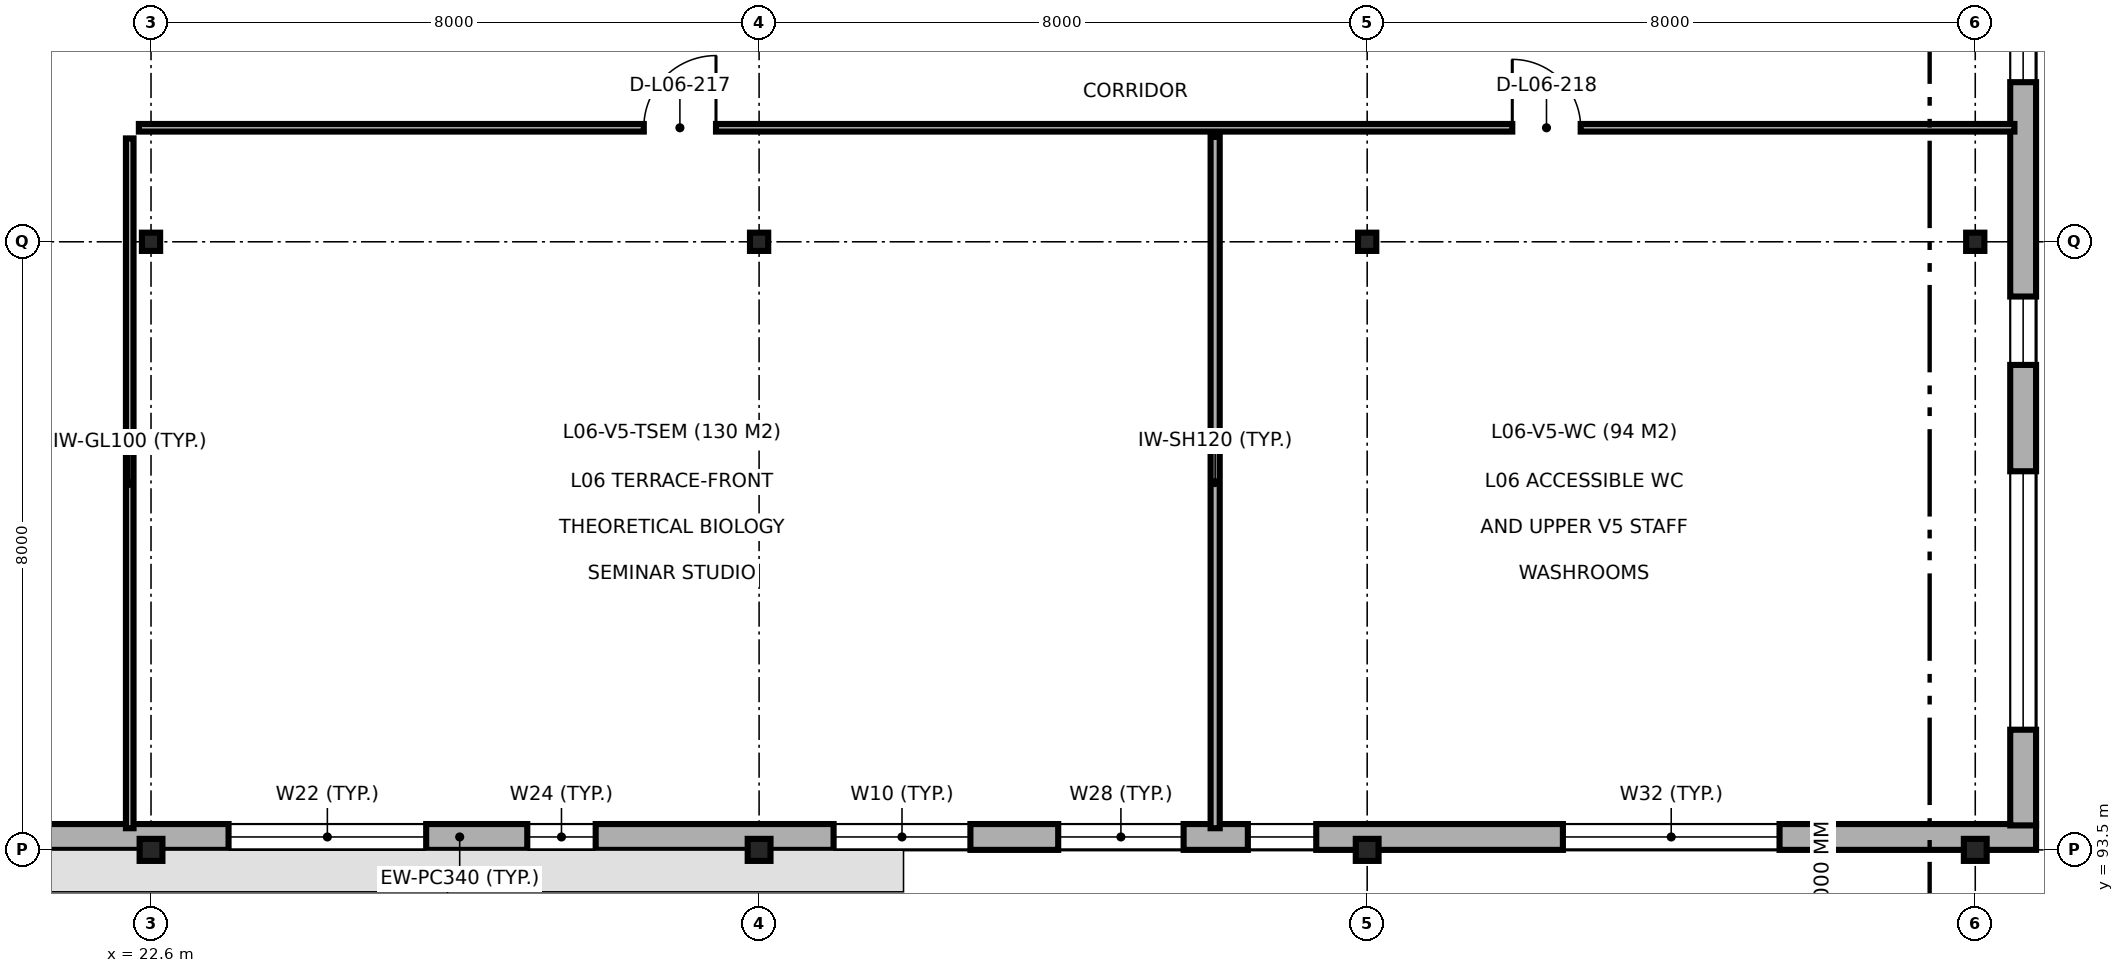
"""IFC4 building model, lengths in metres.
Left out: names, types, materials, properties, quantities, classifications, styles, units other than length and angle.
Written with IfcOpenShell. Run it as: python <this file> out.ifc"""

import sys

from ifc_helpers import new_model, si_unit, direction, frame, frame_2d, origin, origin_2d, place, context, subcontext, project, spatial, rectangle, i_section, extrude, element, fill, save


model = new_model("IFC4")
c1 = context("Model", 3, precision=1e-05, world=origin(), true_north=direction((0.0, 1.0)))
c2 = subcontext(c1, "Body", "Model", "MODEL_VIEW")
j1 = project(units=[si_unit("LENGTHUNIT", "METRE"), si_unit("PLANEANGLEUNIT", "RADIAN")], contexts=[c1])
p1 = place(None, origin())
s1 = spatial("IfcSite", under=j1, at=p1, CompositionType="ELEMENT")
p2 = place(p1, origin())
s2 = spatial("IfcBuilding", under=s1, at=p2, CompositionType="ELEMENT")
p3 = place(p2, frame((0.0, 0.0, 26.7)))
s3 = spatial("IfcBuildingStorey", under=s2, at=p3, CompositionType="ELEMENT", Elevation=26.7)
p4 = place(p3, frame((22.6, 93.5, 0.0), z_axis=(0.0, 0.0, 1.0), x_axis=(1.0, 0.0, 0.0)))
e1 = element("IfcColumn", 1, at=p4, inside=s3, PredefinedType="COLUMN", context=c2, shape_type="SweptSolid", body=[
    extrude(i_section(OverallWidth=0.3, OverallDepth=0.29, WebThickness=0.009, FlangeThickness=0.014, FilletRadius=0.027, at=origin_2d()), origin(), (0.0, 0.0, 1.0), 3.9),
])
p5 = place(p3, frame((22.6, 101.5, 0.0), z_axis=(0.0, 0.0, 1.0), x_axis=(1.0, 0.0, 0.0)))
e2 = element("IfcColumn", 2, at=p5, inside=s3, PredefinedType="COLUMN", context=c2, shape_type="SweptSolid", body=[
    extrude(i_section(OverallWidth=0.24, OverallDepth=0.24, WebThickness=0.01, FlangeThickness=0.017, FilletRadius=0.021, at=origin_2d()), origin(), (0.0, 0.0, 1.0), 3.9),
])
p6 = place(p3, frame((30.6, 93.5, 0.0), z_axis=(0.0, 0.0, 1.0), x_axis=(1.0, 0.0, 0.0)))
e3 = element("IfcColumn", 3, at=p6, inside=s3, PredefinedType="COLUMN", context=c2, shape_type="SweptSolid", body=[
    extrude(i_section(OverallWidth=0.3, OverallDepth=0.29, WebThickness=0.009, FlangeThickness=0.014, FilletRadius=0.027, at=origin_2d()), origin(), (0.0, 0.0, 1.0), 3.9),
])
p7 = place(p3, frame((30.6, 101.5, 0.0), z_axis=(0.0, 0.0, 1.0), x_axis=(1.0, 0.0, 0.0)))
e4 = element("IfcColumn", 4, at=p7, inside=s3, PredefinedType="COLUMN", context=c2, shape_type="SweptSolid", body=[
    extrude(i_section(OverallWidth=0.24, OverallDepth=0.24, WebThickness=0.01, FlangeThickness=0.017, FilletRadius=0.021, at=origin_2d()), origin(), (0.0, 0.0, 1.0), 3.9),
])
p8 = place(p3, frame((38.6, 93.5, 0.0), z_axis=(0.0, 0.0, 1.0), x_axis=(1.0, 0.0, 0.0)))
e5 = element("IfcColumn", 5, at=p8, inside=s3, PredefinedType="COLUMN", context=c2, shape_type="SweptSolid", body=[
    extrude(i_section(OverallWidth=0.3, OverallDepth=0.29, WebThickness=0.009, FlangeThickness=0.014, FilletRadius=0.027, at=origin_2d()), origin(), (0.0, 0.0, 1.0), 3.9),
])
p9 = place(p3, frame((38.6, 101.5, 0.0), z_axis=(0.0, 0.0, 1.0), x_axis=(1.0, 0.0, 0.0)))
e6 = element("IfcColumn", 6, at=p9, inside=s3, PredefinedType="COLUMN", context=c2, shape_type="SweptSolid", body=[
    extrude(i_section(OverallWidth=0.24, OverallDepth=0.24, WebThickness=0.01, FlangeThickness=0.017, FilletRadius=0.021, at=origin_2d()), origin(), (0.0, 0.0, 1.0), 3.9),
])
p10 = place(p3, frame((46.6, 93.5, 0.0), z_axis=(0.0, 0.0, 1.0), x_axis=(1.0, 0.0, 0.0)))
e7 = element("IfcColumn", 7, at=p10, inside=s3, PredefinedType="COLUMN", context=c2, shape_type="SweptSolid", body=[
    extrude(i_section(OverallWidth=0.3, OverallDepth=0.29, WebThickness=0.009, FlangeThickness=0.014, FilletRadius=0.027, at=origin_2d()), origin(), (0.0, 0.0, 1.0), 3.9),
])
p11 = place(p3, frame((46.6, 101.5, 0.0), z_axis=(0.0, 0.0, 1.0), x_axis=(1.0, 0.0, 0.0)))
e8 = element("IfcColumn", 8, at=p11, inside=s3, PredefinedType="COLUMN", context=c2, shape_type="SweptSolid", body=[
    extrude(i_section(OverallWidth=0.24, OverallDepth=0.24, WebThickness=0.01, FlangeThickness=0.017, FilletRadius=0.021, at=origin_2d()), origin(), (0.0, 0.0, 1.0), 3.9),
])
p12 = place(p3, frame((5.922, 93.67, 0.0), z_axis=(0.0, 0.0, 1.0), x_axis=(1.0, 0.0, 0.0)))
e9 = element("IfcWall", 9, at=p12, inside=s3, PredefinedType="SOLIDWALL", context=c2, shape_type="SweptSolid", body=[
    extrude(rectangle(XDim=41.478, YDim=0.34, at=frame_2d((20.739, 0.0))), origin(), (0.0, 0.0, 1.0), 3.66),
])
p13 = place(p12, frame((3.928, 0.0, 0.9)))
e10 = element("IfcOpeningElement", 10, at=p13, cuts=e9, PredefinedType="OPENING", context=c2, shape_type="SweptSolid", body=[
    extrude(rectangle(XDim=1.5, YDim=1.5, at=frame_2d((0.75, 0.75))), frame((0.0, 0.18, 0.0), z_axis=(0.0, -1.0, 0.0), x_axis=(1.0, 0.0, 0.0)), (0.0, 0.0, 1.0), 0.36),
])
p14 = place(p12, frame((9.498, 0.0, 0.9)))
e11 = element("IfcOpeningElement", 11, at=p14, cuts=e9, PredefinedType="OPENING", context=c2, shape_type="SweptSolid", body=[
    extrude(rectangle(XDim=2.4, YDim=1.5, at=frame_2d((1.2, 0.75))), frame((0.0, 0.18, 0.0), z_axis=(0.0, -1.0, 0.0), x_axis=(1.0, 0.0, 0.0)), (0.0, 0.0, 1.0), 0.36),
])
p15 = place(p12, frame((13.438, 0.0, 0.9)))
e12 = element("IfcOpeningElement", 12, at=p15, cuts=e9, PredefinedType="OPENING", context=c2, shape_type="SweptSolid", body=[
    extrude(rectangle(XDim=1.6, YDim=2.4, at=frame_2d((0.8, 1.2))), frame((0.0, 0.18, 0.0), z_axis=(0.0, -1.0, 0.0), x_axis=(1.0, 0.0, 0.0)), (0.0, 0.0, 1.0), 0.36),
])
p16 = place(p12, frame((17.698, 0.0, 0.9)))
e13 = element("IfcOpeningElement", 13, at=p16, cuts=e9, PredefinedType="OPENING", context=c2, shape_type="SweptSolid", body=[
    extrude(rectangle(XDim=2.6, YDim=2.4, at=frame_2d((1.3, 1.2))), frame((0.0, 0.18, 0.0), z_axis=(0.0, -1.0, 0.0), x_axis=(1.0, 0.0, 0.0)), (0.0, 0.0, 1.0), 0.36),
])
p17 = place(p12, frame((21.628, 0.0, 0.9)))
e14 = element("IfcOpeningElement", 14, at=p17, cuts=e9, PredefinedType="OPENING", context=c2, shape_type="SweptSolid", body=[
    extrude(rectangle(XDim=0.9, YDim=1.8, at=frame_2d((0.45, 0.9))), frame((0.0, 0.18, 0.0), z_axis=(0.0, -1.0, 0.0), x_axis=(1.0, 0.0, 0.0)), (0.0, 0.0, 1.0), 0.36),
])
p18 = place(p12, frame((25.658, 0.0, 0.9)))
e15 = element("IfcOpeningElement", 15, at=p18, cuts=e9, PredefinedType="OPENING", context=c2, shape_type="SweptSolid", body=[
    extrude(rectangle(XDim=1.8, YDim=2.1, at=frame_2d((0.9, 1.05))), frame((0.0, 0.18, 0.0), z_axis=(0.0, -1.0, 0.0), x_axis=(1.0, 0.0, 0.0)), (0.0, 0.0, 1.0), 0.36),
])
p19 = place(p12, frame((28.613, 0.0, 0.9)))
e16 = element("IfcOpeningElement", 16, at=p19, cuts=e9, PredefinedType="OPENING", context=c2, shape_type="SweptSolid", body=[
    extrude(rectangle(XDim=1.65, YDim=1.95, at=frame_2d((0.825, 0.975))), frame((0.0, 0.18, 0.0), z_axis=(0.0, -1.0, 0.0), x_axis=(1.0, 0.0, 0.0)), (0.0, 0.0, 1.0), 0.36),
])
p20 = place(p12, frame((31.108, 0.0, 0.9)))
e17 = element("IfcOpeningElement", 17, at=p20, cuts=e9, PredefinedType="OPENING", context=c2, shape_type="SweptSolid", body=[
    extrude(rectangle(XDim=0.9, YDim=1.8, at=frame_2d((0.45, 0.9))), frame((0.0, 0.18, 0.0), z_axis=(0.0, -1.0, 0.0), x_axis=(1.0, 0.0, 0.0)), (0.0, 0.0, 1.0), 0.36),
])
p21 = place(p12, frame((35.253, 0.0, 0.9)))
e18 = element("IfcOpeningElement", 18, at=p21, cuts=e9, PredefinedType="OPENING", context=c2, shape_type="SweptSolid", body=[
    extrude(rectangle(XDim=2.85, YDim=1.95, at=frame_2d((1.425, 0.975))), frame((0.0, 0.18, 0.0), z_axis=(0.0, -1.0, 0.0), x_axis=(1.0, 0.0, 0.0)), (0.0, 0.0, 1.0), 0.36),
])
p22 = place(p3, frame((47.23, 93.822, 0.0), z_axis=(0.0, 0.0, 1.0), x_axis=(0.0, 1.0, 0.0)))
e19 = element("IfcWall", 19, at=p22, inside=s3, PredefinedType="SOLIDWALL", context=c2, shape_type="SweptSolid", body=[
    extrude(rectangle(XDim=22.278, YDim=0.34, at=frame_2d((11.139, 0.0))), origin(), (0.0, 0.0, 1.0), 3.66),
])
p23 = place(p22, frame((1.259, 0.0, 0.9)))
e20 = element("IfcOpeningElement", 20, at=p23, cuts=e19, PredefinedType="OPENING", context=c2, shape_type="SweptSolid", body=[
    extrude(rectangle(XDim=3.4, YDim=1.95, at=frame_2d((1.7, 0.975))), frame((0.0, 0.18, 0.0), z_axis=(0.0, -1.0, 0.0), x_axis=(1.0, 0.0, 0.0)), (0.0, 0.0, 1.0), 0.36),
])
p24 = place(p22, frame((6.058, 0.0, 0.9)))
e21 = element("IfcOpeningElement", 21, at=p24, cuts=e19, PredefinedType="OPENING", context=c2, shape_type="SweptSolid", body=[
    extrude(rectangle(XDim=0.9, YDim=1.8, at=frame_2d((0.45, 0.9))), frame((0.0, 0.18, 0.0), z_axis=(0.0, -1.0, 0.0), x_axis=(1.0, 0.0, 0.0)), (0.0, 0.0, 1.0), 0.36),
])
p25 = place(p22, frame((9.778, 0.0, 0.9)))
e22 = element("IfcOpeningElement", 22, at=p25, cuts=e19, PredefinedType="OPENING", context=c2, shape_type="SweptSolid", body=[
    extrude(rectangle(XDim=1.2, YDim=1.8, at=frame_2d((0.6, 0.9))), frame((0.0, 0.18, 0.0), z_axis=(0.0, -1.0, 0.0), x_axis=(1.0, 0.0, 0.0)), (0.0, 0.0, 1.0), 0.36),
])
p26 = place(p22, frame((12.083, 0.0, 0.9)))
e23 = element("IfcOpeningElement", 23, at=p26, cuts=e19, PredefinedType="OPENING", context=c2, shape_type="SweptSolid", body=[
    extrude(rectangle(XDim=2.85, YDim=1.95, at=frame_2d((1.425, 0.975))), frame((0.0, 0.18, 0.0), z_axis=(0.0, -1.0, 0.0), x_axis=(1.0, 0.0, 0.0)), (0.0, 0.0, 1.0), 0.36),
])
p27 = place(p22, frame((17.568, 0.0, 0.9)))
e24 = element("IfcOpeningElement", 24, at=p27, cuts=e19, PredefinedType="OPENING", context=c2, shape_type="SweptSolid", body=[
    extrude(rectangle(XDim=2.2, YDim=1.65, at=frame_2d((1.1, 0.825))), frame((0.0, 0.18, 0.0), z_axis=(0.0, -1.0, 0.0), x_axis=(1.0, 0.0, 0.0)), (0.0, 0.0, 1.0), 0.36),
])
p28 = place(p3, frame((22.32, 93.785, 0.0), z_axis=(0.0, 0.0, 1.0), x_axis=(0.0, 1.0, 0.0)))
e25 = element("IfcWall", 25, at=p28, inside=s3, PredefinedType="PARTITIONING", context=c2, shape_type="SweptSolid", body=[
    extrude(rectangle(XDim=9.075, YDim=0.1, at=frame_2d((4.538, 0.0))), origin(), (0.0, 0.0, 1.0), 3.26),
])
p29 = place(p3, frame((36.6, 93.785, 0.0), z_axis=(0.0, 0.0, 1.0), x_axis=(0.0, 1.0, 0.0)))
e26 = element("IfcWall", 26, at=p29, inside=s3, PredefinedType="PARTITIONING", context=c2, shape_type="SweptSolid", body=[
    extrude(rectangle(XDim=9.095, YDim=0.12, at=frame_2d((4.547, 0.0))), origin(), (0.0, 0.0, 1.0), 3.68),
])
p30 = place(p3, frame((22.44, 103.0, 0.0), z_axis=(0.0, 0.0, 1.0), x_axis=(1.0, 0.0, 0.0)))
e27 = element("IfcWall", 27, at=p30, inside=s3, PredefinedType="PARTITIONING", context=c2, shape_type="SweptSolid", body=[
    extrude(rectangle(XDim=24.675, YDim=0.1, at=frame_2d((12.337, 0.0))), origin(), (0.0, 0.0, 1.0), 3.68),
])
p31 = place(p30, frame((6.643, 0.0, 0.0)))
e28 = element("IfcOpeningElement", 28, at=p31, cuts=e27, PredefinedType="OPENING", context=c2, shape_type="SweptSolid", body=[
    extrude(rectangle(XDim=0.95, YDim=2.1, at=frame_2d((0.475, 1.05))), frame((0.0, 0.06, 0.0), z_axis=(0.0, -1.0, 0.0), x_axis=(1.0, 0.0, 0.0)), (0.0, 0.0, 1.0), 0.12),
])
p32 = place(p30, frame((18.069, 0.0, 0.0)))
e29 = element("IfcOpeningElement", 29, at=p32, cuts=e27, PredefinedType="OPENING", context=c2, shape_type="SweptSolid", body=[
    extrude(rectangle(XDim=0.9, YDim=2.1, at=frame_2d((0.45, 1.05))), frame((0.0, 0.06, 0.0), z_axis=(0.0, -1.0, 0.0), x_axis=(1.0, 0.0, 0.0)), (0.0, 0.0, 1.0), 0.12),
])
p33 = place(p16, origin())
e30 = element("IfcWindow", 30, at=p33, inside=s3, PartitioningType="SINGLE_PANEL", PredefinedType="WINDOW", context=c2, shape_type="SweptSolid", body=[
    extrude(rectangle(XDim=2.6, YDim=2.4, at=frame_2d((1.3, 1.2))), frame((0.0, 0.03, 0.0), z_axis=(0.0, -1.0, 0.0), x_axis=(1.0, 0.0, 0.0)), (0.0, 0.0, 1.0), 0.06),
])
fill(e13, e30)
p34 = place(p17, origin())
e31 = element("IfcWindow", 31, at=p34, inside=s3, PartitioningType="SINGLE_PANEL", PredefinedType="WINDOW", context=c2, shape_type="SweptSolid", body=[
    extrude(rectangle(XDim=0.9, YDim=1.8, at=frame_2d((0.45, 0.9))), frame((0.0, 0.03, 0.0), z_axis=(0.0, -1.0, 0.0), x_axis=(1.0, 0.0, 0.0)), (0.0, 0.0, 1.0), 0.06),
])
fill(e14, e31)
p35 = place(p18, origin())
e32 = element("IfcWindow", 32, at=p35, inside=s3, PartitioningType="SINGLE_PANEL", PredefinedType="WINDOW", context=c2, shape_type="SweptSolid", body=[
    extrude(rectangle(XDim=1.8, YDim=2.1, at=frame_2d((0.9, 1.05))), frame((0.0, 0.03, 0.0), z_axis=(0.0, -1.0, 0.0), x_axis=(1.0, 0.0, 0.0)), (0.0, 0.0, 1.0), 0.06),
])
fill(e15, e32)
p36 = place(p19, origin())
e33 = element("IfcWindow", 33, at=p36, inside=s3, PartitioningType="SINGLE_PANEL", PredefinedType="WINDOW", context=c2, shape_type="SweptSolid", body=[
    extrude(rectangle(XDim=1.65, YDim=1.95, at=frame_2d((0.825, 0.975))), frame((0.0, 0.03, 0.0), z_axis=(0.0, -1.0, 0.0), x_axis=(1.0, 0.0, 0.0)), (0.0, 0.0, 1.0), 0.06),
])
fill(e16, e33)
p37 = place(p20, origin())
e34 = element("IfcWindow", 34, at=p37, inside=s3, PartitioningType="SINGLE_PANEL", PredefinedType="WINDOW", context=c2, shape_type="SweptSolid", body=[
    extrude(rectangle(XDim=0.9, YDim=1.8, at=frame_2d((0.45, 0.9))), frame((0.0, 0.03, 0.0), z_axis=(0.0, -1.0, 0.0), x_axis=(1.0, 0.0, 0.0)), (0.0, 0.0, 1.0), 0.06),
])
fill(e17, e34)
p38 = place(p21, origin())
e35 = element("IfcWindow", 35, at=p38, inside=s3, PartitioningType="SINGLE_PANEL", PredefinedType="WINDOW", context=c2, shape_type="SweptSolid", body=[
    extrude(rectangle(XDim=2.85, YDim=1.95, at=frame_2d((1.425, 0.975))), frame((0.0, 0.03, 0.0), z_axis=(0.0, -1.0, 0.0), x_axis=(1.0, 0.0, 0.0)), (0.0, 0.0, 1.0), 0.06),
])
fill(e18, e35)
p39 = place(p23, origin())
e36 = element("IfcWindow", 36, at=p39, inside=s3, PartitioningType="SINGLE_PANEL", PredefinedType="WINDOW", context=c2, shape_type="SweptSolid", body=[
    extrude(rectangle(XDim=3.4, YDim=1.95, at=frame_2d((1.7, 0.975))), frame((0.0, 0.03, 0.0), z_axis=(0.0, -1.0, 0.0), x_axis=(1.0, 0.0, 0.0)), (0.0, 0.0, 1.0), 0.06),
])
fill(e20, e36)
p40 = place(p24, origin())
e37 = element("IfcWindow", 37, at=p40, inside=s3, PartitioningType="SINGLE_PANEL", PredefinedType="WINDOW", context=c2, shape_type="SweptSolid", body=[
    extrude(rectangle(XDim=0.9, YDim=1.8, at=frame_2d((0.45, 0.9))), frame((0.0, 0.03, 0.0), z_axis=(0.0, -1.0, 0.0), x_axis=(1.0, 0.0, 0.0)), (0.0, 0.0, 1.0), 0.06),
])
fill(e21, e37)
p41 = place(p25, origin())
e38 = element("IfcWindow", 38, at=p41, inside=s3, PartitioningType="SINGLE_PANEL", PredefinedType="WINDOW", context=c2, shape_type="SweptSolid", body=[
    extrude(rectangle(XDim=1.2, YDim=1.8, at=frame_2d((0.6, 0.9))), frame((0.0, 0.03, 0.0), z_axis=(0.0, -1.0, 0.0), x_axis=(1.0, 0.0, 0.0)), (0.0, 0.0, 1.0), 0.06),
])
fill(e22, e38)
p42 = place(p31, origin())
e39 = element("IfcDoor", 39, at=p42, inside=s3, OperationType="SINGLE_SWING_RIGHT", PredefinedType="DOOR", context=c2, shape_type="SweptSolid", body=[
    extrude(rectangle(XDim=0.95, YDim=2.1, at=frame_2d((0.475, 1.05))), frame((0.0, 0.025, 0.0), z_axis=(0.0, -1.0, 0.0), x_axis=(1.0, 0.0, 0.0)), (0.0, 0.0, 1.0), 0.05),
])
fill(e28, e39)
p43 = place(p32, origin())
e40 = element("IfcDoor", 40, at=p43, inside=s3, OperationType="SINGLE_SWING_LEFT", PredefinedType="DOOR", context=c2, shape_type="SweptSolid", body=[
    extrude(rectangle(XDim=0.9, YDim=2.1, at=frame_2d((0.45, 1.05))), frame((0.0, 0.025, 0.0), z_axis=(0.0, -1.0, 0.0), x_axis=(1.0, 0.0, 0.0)), (0.0, 0.0, 1.0), 0.05),
])
fill(e29, e40)
save(model, sys.argv[1])
